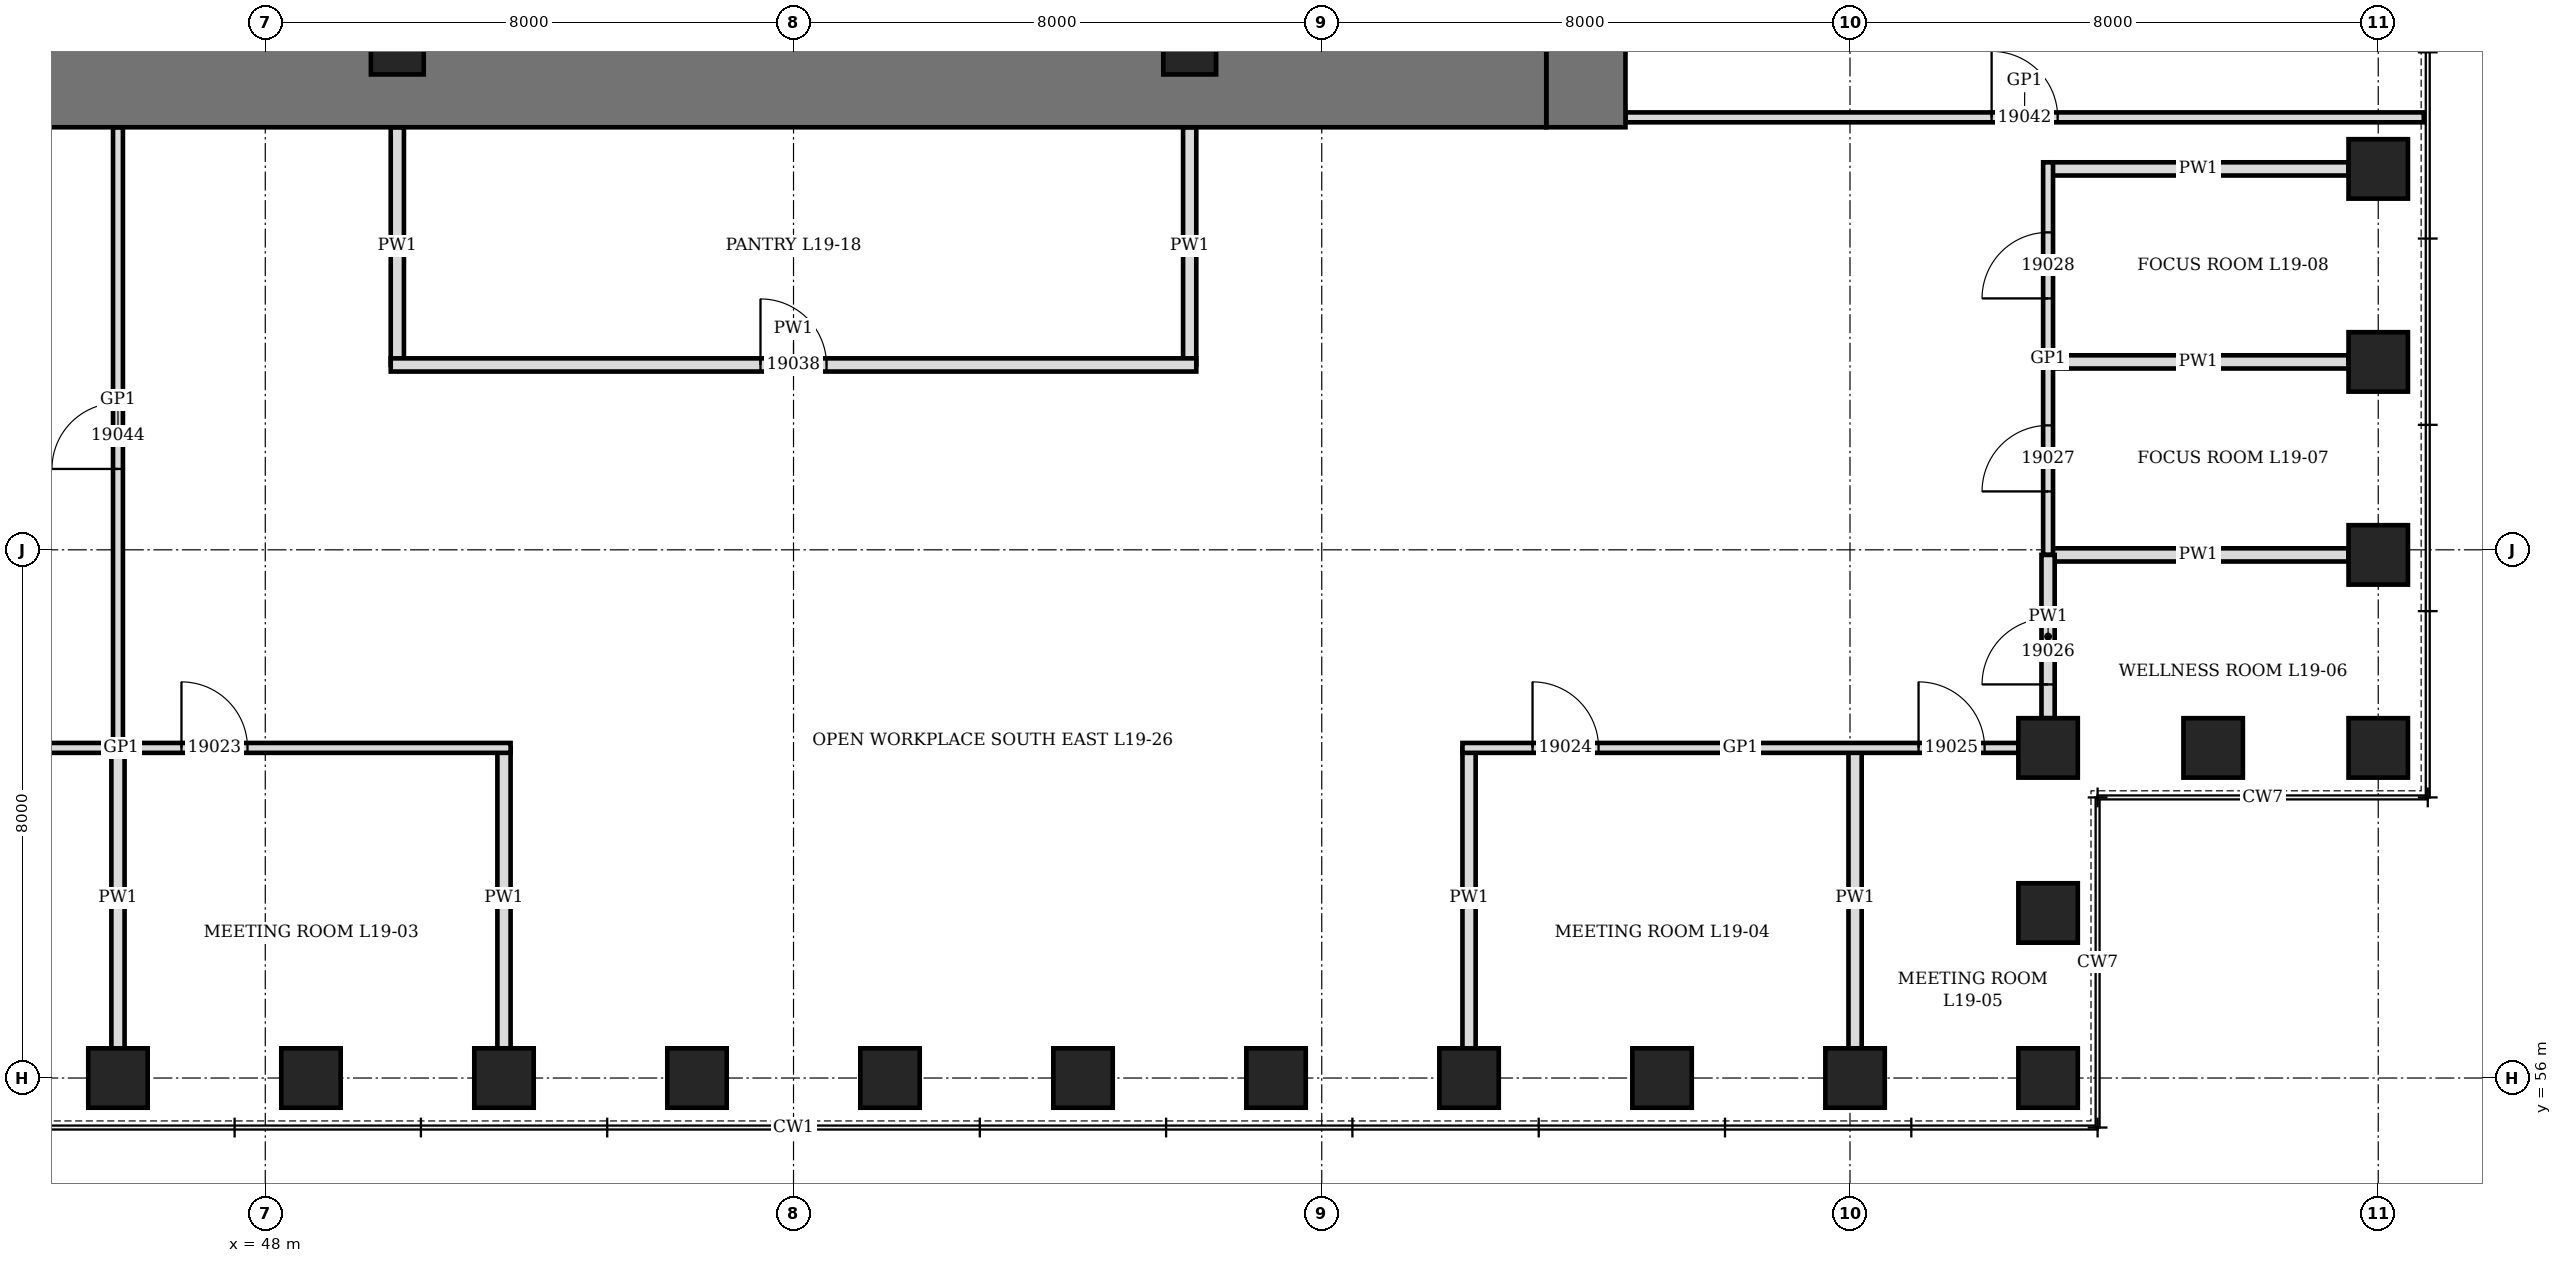
"""IFC4 building model, lengths in metres.
Left out: names, types, materials, properties, quantities, classifications, styles, units other than length and angle.
Written with IfcOpenShell. Run it as: python <this file> out.ifc"""

import sys

from ifc_helpers import new_model, si_unit, direction, frame, frame_2d, origin, origin_2d, place, context, subcontext, project, spatial, rectangle, hollow_rectangle, extrude, element, fill, save


model = new_model("IFC4")
c1 = context("Model", 3, precision=1e-05, world=origin(), true_north=direction((0.0, 1.0)))
c2 = subcontext(c1, "Body", "Model", "MODEL_VIEW")
j1 = project(units=[si_unit("LENGTHUNIT", "METRE"), si_unit("PLANEANGLEUNIT", "RADIAN")], contexts=[c1])
p1 = place(None, origin())
s1 = spatial("IfcSite", under=j1, at=p1, CompositionType="ELEMENT")
p2 = place(p1, origin())
s2 = spatial("IfcBuilding", under=s1, at=p2, CompositionType="ELEMENT")
p3 = place(p2, frame((0.0, 0.0, 89.5)))
s3 = spatial("IfcBuildingStorey", under=s2, at=p3, CompositionType="ELEMENT", Elevation=89.5)
for number, where, z_axis, x_axis in (
    (1, (45.769, 56.0, 0.0), (0.0, 0.0, 1.0), (1.0, 0.0, 0.0)),
    (2, (48.692, 56.0, 0.0), (0.0, 0.0, 1.0), (1.0, 0.0, 0.0)),
    (3, (51.615, 56.0, 0.0), (0.0, 0.0, 1.0), (1.0, 0.0, 0.0)),
    (4, (54.539, 56.0, 0.0), (0.0, 0.0, 1.0), (1.0, 0.0, 0.0)),
    (5, (57.461, 56.0, 0.0), (0.0, 0.0, 1.0), (1.0, 0.0, 0.0)),
    (6, (60.385, 56.0, 0.0), (0.0, 0.0, 1.0), (1.0, 0.0, 0.0)),
    (7, (63.308, 56.0, 0.0), (0.0, 0.0, 1.0), (1.0, 0.0, 0.0)),
    (8, (66.231, 56.0, 0.0), (0.0, 0.0, 1.0), (1.0, 0.0, 0.0)),
    (9, (69.154, 56.0, 0.0), (0.0, 0.0, 1.0), (1.0, 0.0, 0.0)),
    (10, (72.077, 56.0, 0.0), (0.0, 0.0, 1.0), (1.0, 0.0, 0.0)),
    (11, (75.0, 56.0, 0.0), (0.0, 0.0, 1.0), (0.0, 1.0, 0.0)),
    (12, (75.0, 58.5, 0.0), (0.0, 0.0, 1.0), (0.0, 1.0, 0.0)),
    (13, (75.0, 61.0, 0.0), (0.0, 0.0, 1.0), (1.0, 0.0, 0.0)),
    (14, (77.5, 61.0, 0.0), (0.0, 0.0, 1.0), (1.0, 0.0, 0.0)),
    (15, (80.0, 61.0, 0.0), (0.0, 0.0, 1.0), (0.0, 1.0, 0.0)),
    (16, (80.0, 63.923, 0.0), (0.0, 0.0, 1.0), (0.0, 1.0, 0.0)),
    (17, (80.0, 66.846, 0.0), (0.0, 0.0, 1.0), (0.0, 1.0, 0.0)),
    (18, (80.0, 69.769, 0.0), (0.0, 0.0, 1.0), (0.0, 1.0, 0.0)),
):
    element("IfcColumn", number, at=place(p3, frame(where, z_axis=z_axis, x_axis=x_axis)), inside=s3, PredefinedType="COLUMN", context=c2, shape_type="SweptSolid", body=[
        extrude(hollow_rectangle(XDim=0.9, YDim=0.9, WallThickness=0.12, at=origin_2d()), origin(), (0.0, 0.0, 1.0), 4.2),
    ])
p4 = place(p3, frame((68.0, 70.4, 0.0), z_axis=(0.0, 0.0, 1.0), x_axis=(0.0, 1.0, 0.0)))
e19 = element("IfcWall", 19, at=p4, inside=s3, PredefinedType="SHEAR", context=c2, shape_type="SweptSolid", body=[
    extrude(rectangle(XDim=19.2, YDim=1.2, at=frame_2d((9.6, 0.0))), origin(), (0.0, 0.0, 1.0), 4.2),
])
p5 = place(p4, frame((8.6, 0.0, 0.0)))
e20 = element("IfcOpeningElement", 20, at=p5, cuts=e19, PredefinedType="OPENING", context=c2, shape_type="SweptSolid", body=[
    extrude(rectangle(XDim=2.0, YDim=2.4, at=frame_2d((1.0, 1.2))), frame((0.0, 0.61, 0.0), z_axis=(0.0, -1.0, 0.0), x_axis=(1.0, 0.0, 0.0)), (0.0, 0.0, 1.0), 1.22),
])
p6 = place(p3, frame((44.6, 71.0, 0.0), z_axis=(0.0, 0.0, 1.0), x_axis=(1.0, 0.0, 0.0)))
e21 = element("IfcWall", 21, at=p6, inside=s3, PredefinedType="SHEAR", context=c2, shape_type="SweptSolid", body=[
    extrude(rectangle(XDim=22.8, YDim=1.2, at=frame_2d((11.4, 0.0))), origin(), (0.0, 0.0, 1.0), 4.2),
])
for number, where, z_axis, x_axis in (
    (22, (50.0, 71.6, 0.0), (0.0, 0.0, 1.0), (1.0, 0.0, 0.0)),
    (23, (62.0, 71.6, 0.0), (0.0, 0.0, 1.0), (1.0, 0.0, 0.0)),
):
    element("IfcColumn", number, at=place(p3, frame(where, z_axis=z_axis, x_axis=x_axis)), inside=s3, PredefinedType="COLUMN", context=c2, shape_type="SweptSolid", body=[
        extrude(hollow_rectangle(XDim=0.8, YDim=0.8, WallThickness=0.1, at=origin_2d()), origin(), (0.0, 0.0, 1.0), 4.2),
    ])
for number, where, z_axis, x_axis in (
    (24, (45.769, 56.45, 0.0), (0.0, 0.0, 1.0), (0.0, 1.0, 0.0)),
    (25, (51.615, 56.45, 0.0), (0.0, 0.0, 1.0), (0.0, 1.0, 0.0)),
    (26, (66.231, 56.45, 0.0), (0.0, 0.0, 1.0), (0.0, 1.0, 0.0)),
):
    element("IfcWall", number, at=place(p3, frame(where, z_axis=z_axis, x_axis=x_axis)), inside=s3, PredefinedType="PARTITIONING", context=c2, shape_type="SweptSolid", body=[
        extrude(rectangle(XDim=4.55, YDim=0.2, at=frame_2d((2.275, 0.0))), origin(), (0.0, 0.0, 1.0), 3.278),
    ])
for number, where, z_axis, x_axis in (
    (27, (72.077, 56.45, 0.0), (0.0, 0.0, 1.0), (0.0, 1.0, 0.0)),
    (28, (75.0, 63.923, 0.0), (0.0, 0.0, 1.0), (1.0, 0.0, 0.0)),
    (29, (75.0, 66.846, 0.0), (0.0, 0.0, 1.0), (1.0, 0.0, 0.0)),
    (30, (75.0, 69.769, 0.0), (0.0, 0.0, 1.0), (1.0, 0.0, 0.0)),
):
    element("IfcWall", number, at=place(p3, frame(where, z_axis=z_axis, x_axis=x_axis)), inside=s3, PredefinedType="PARTITIONING", context=c2, shape_type="SweptSolid", body=[
        extrude(rectangle(XDim=4.55, YDim=0.2, at=frame_2d((2.275, 0.0))), origin(), (0.0, 0.0, 1.0), 3.428),
    ])
for number, where, z_axis, x_axis in (
    (31, (50.0, 66.8, 0.0), (0.0, 0.0, 1.0), (0.0, 1.0, 0.0)),
    (32, (62.0, 66.8, 0.0), (0.0, 0.0, 1.0), (0.0, 1.0, 0.0)),
):
    element("IfcWall", number, at=place(p3, frame(where, z_axis=z_axis, x_axis=x_axis)), inside=s3, PredefinedType="PARTITIONING", context=c2, shape_type="SweptSolid", body=[
        extrude(rectangle(XDim=3.6, YDim=0.2, at=frame_2d((1.8, 0.0))), origin(), (0.0, 0.0, 1.0), 4.04),
    ])
p7 = place(p3, frame((39.923, 61.0, 0.0), z_axis=(0.0, 0.0, 1.0), x_axis=(1.0, 0.0, 0.0)))
e33 = element("IfcWall", 33, at=p7, inside=s3, PredefinedType="PARTITIONING", context=c2, shape_type="SweptSolid", body=[
    extrude(rectangle(XDim=11.792, YDim=0.15, at=frame_2d((5.896, 0.0))), origin(), (0.0, 0.0, 1.0), 4.04),
])
p8 = place(p7, frame((0.961, 0.0, 0.0)))
e34 = element("IfcOpeningElement", 34, at=p8, cuts=e33, PredefinedType="OPENING", context=c2, shape_type="SweptSolid", body=[
    extrude(rectangle(XDim=1.0, YDim=2.4, at=frame_2d((0.5, 1.2))), frame((0.0, 0.085, 0.0), z_axis=(0.0, -1.0, 0.0), x_axis=(1.0, 0.0, 0.0)), (0.0, 0.0, 1.0), 0.17),
])
p9 = place(p7, frame((6.808, 0.0, 0.0)))
e35 = element("IfcOpeningElement", 35, at=p9, cuts=e33, PredefinedType="OPENING", context=c2, shape_type="SweptSolid", body=[
    extrude(rectangle(XDim=1.0, YDim=2.4, at=frame_2d((0.5, 1.2))), frame((0.0, 0.085, 0.0), z_axis=(0.0, -1.0, 0.0), x_axis=(1.0, 0.0, 0.0)), (0.0, 0.0, 1.0), 0.17),
])
p10 = place(p3, frame((66.131, 61.0, 0.0), z_axis=(0.0, 0.0, 1.0), x_axis=(1.0, 0.0, 0.0)))
e36 = element("IfcWall", 36, at=p10, inside=s3, PredefinedType="PARTITIONING", context=c2, shape_type="SweptSolid", body=[
    extrude(rectangle(XDim=8.419, YDim=0.15, at=frame_2d((4.209, 0.0))), origin(), (0.0, 0.0, 1.0), 4.04),
])
p11 = place(p10, frame((1.062, 0.0, 0.0)))
e37 = element("IfcOpeningElement", 37, at=p11, cuts=e36, PredefinedType="OPENING", context=c2, shape_type="SweptSolid", body=[
    extrude(rectangle(XDim=1.0, YDim=2.4, at=frame_2d((0.5, 1.2))), frame((0.0, 0.085, 0.0), z_axis=(0.0, -1.0, 0.0), x_axis=(1.0, 0.0, 0.0)), (0.0, 0.0, 1.0), 0.17),
])
p12 = place(p10, frame((6.908, 0.0, 0.0)))
e38 = element("IfcOpeningElement", 38, at=p12, cuts=e36, PredefinedType="OPENING", context=c2, shape_type="SweptSolid", body=[
    extrude(rectangle(XDim=1.0, YDim=2.4, at=frame_2d((0.5, 1.2))), frame((0.0, 0.085, 0.0), z_axis=(0.0, -1.0, 0.0), x_axis=(1.0, 0.0, 0.0)), (0.0, 0.0, 1.0), 0.17),
])
p13 = place(p3, frame((49.9, 66.8, 0.0), z_axis=(0.0, 0.0, 1.0), x_axis=(1.0, 0.0, 0.0)))
e39 = element("IfcWall", 39, at=p13, inside=s3, PredefinedType="PARTITIONING", context=c2, shape_type="SweptSolid", body=[
    extrude(rectangle(XDim=12.2, YDim=0.2, at=frame_2d((6.1, 0.0))), origin(), (0.0, 0.0, 1.0), 4.04),
])
p14 = place(p13, frame((5.6, 0.0, 0.0)))
e40 = element("IfcOpeningElement", 40, at=p14, cuts=e39, PredefinedType="OPENING", context=c2, shape_type="SweptSolid", body=[
    extrude(rectangle(XDim=1.0, YDim=2.1, at=frame_2d((0.5, 1.05))), frame((0.0, 0.11, 0.0), z_axis=(0.0, -1.0, 0.0), x_axis=(1.0, 0.0, 0.0)), (0.0, 0.0, 1.0), 0.22),
])
p15 = place(p3, frame((68.6, 70.55, 0.0), z_axis=(0.0, 0.0, 1.0), x_axis=(1.0, 0.0, 0.0)))
e41 = element("IfcWall", 41, at=p15, inside=s3, PredefinedType="PARTITIONING", context=c2, shape_type="SweptSolid", body=[
    extrude(rectangle(XDim=12.09, YDim=0.15, at=frame_2d((6.045, 0.0))), origin(), (0.0, 0.0, 1.0), 4.04),
])
p16 = place(p15, frame((5.545, 0.0, 0.0)))
e42 = element("IfcOpeningElement", 42, at=p16, cuts=e41, PredefinedType="OPENING", context=c2, shape_type="SweptSolid", body=[
    extrude(rectangle(XDim=1.0, YDim=2.4, at=frame_2d((0.5, 1.2))), frame((0.0, 0.085, 0.0), z_axis=(0.0, -1.0, 0.0), x_axis=(1.0, 0.0, 0.0)), (0.0, 0.0, 1.0), 0.17),
])
p17 = place(p3, frame((45.769, 61.05, 0.0), z_axis=(0.0, 0.0, 1.0), x_axis=(0.0, 1.0, 0.0)))
e43 = element("IfcWall", 43, at=p17, inside=s3, PredefinedType="PARTITIONING", context=c2, shape_type="SweptSolid", body=[
    extrude(rectangle(XDim=9.35, YDim=0.15, at=frame_2d((4.675, 0.0))), origin(), (0.0, 0.0, 1.0), 3.278),
])
p18 = place(p17, frame((4.175, 0.0, 0.0)))
e44 = element("IfcOpeningElement", 44, at=p18, cuts=e43, PredefinedType="OPENING", context=c2, shape_type="SweptSolid", body=[
    extrude(rectangle(XDim=1.0, YDim=2.4, at=frame_2d((0.5, 1.2))), frame((0.0, 0.085, 0.0), z_axis=(0.0, -1.0, 0.0), x_axis=(1.0, 0.0, 0.0)), (0.0, 0.0, 1.0), 0.17),
])
p19 = place(p3, frame((75.0, 63.923, 0.0), z_axis=(0.0, 0.0, 1.0), x_axis=(0.0, 1.0, 0.0)))
e45 = element("IfcWall", 45, at=p19, inside=s3, PredefinedType="PARTITIONING", context=c2, shape_type="SweptSolid", body=[
    extrude(rectangle(XDim=5.946, YDim=0.15, at=frame_2d((2.973, 0.0))), origin(), (0.0, 0.0, 1.0), 4.04),
])
p20 = place(p19, frame((0.961, 0.0, 0.0)))
e46 = element("IfcOpeningElement", 46, at=p20, cuts=e45, PredefinedType="OPENING", context=c2, shape_type="SweptSolid", body=[
    extrude(rectangle(XDim=1.0, YDim=2.4, at=frame_2d((0.5, 1.2))), frame((0.0, 0.085, 0.0), z_axis=(0.0, -1.0, 0.0), x_axis=(1.0, 0.0, 0.0)), (0.0, 0.0, 1.0), 0.17),
])
p21 = place(p19, frame((3.885, 0.0, 0.0)))
e47 = element("IfcOpeningElement", 47, at=p21, cuts=e45, PredefinedType="OPENING", context=c2, shape_type="SweptSolid", body=[
    extrude(rectangle(XDim=1.0, YDim=2.4, at=frame_2d((0.5, 1.2))), frame((0.0, 0.085, 0.0), z_axis=(0.0, -1.0, 0.0), x_axis=(1.0, 0.0, 0.0)), (0.0, 0.0, 1.0), 0.17),
])
p22 = place(p3, frame((75.0, 61.45, 0.0), z_axis=(0.0, 0.0, 1.0), x_axis=(0.0, 1.0, 0.0)))
e48 = element("IfcWall", 48, at=p22, inside=s3, PredefinedType="PARTITIONING", context=c2, shape_type="SweptSolid", body=[
    extrude(rectangle(XDim=2.473, YDim=0.2, at=frame_2d((1.237, 0.0))), origin(), (0.0, 0.0, 1.0), 4.04),
])
p23 = place(p22, frame((0.511, 0.0, 0.0)))
e49 = element("IfcOpeningElement", 49, at=p23, cuts=e48, PredefinedType="OPENING", context=c2, shape_type="SweptSolid", body=[
    extrude(rectangle(XDim=1.0, YDim=2.1, at=frame_2d((0.5, 1.05))), frame((0.0, 0.11, 0.0), z_axis=(0.0, -1.0, 0.0), x_axis=(1.0, 0.0, 0.0)), (0.0, 0.0, 1.0), 0.22),
])
p24 = place(p9, origin())
e50 = element("IfcDoor", 50, at=p24, inside=s3, OperationType="SINGLE_SWING_RIGHT", PredefinedType="DOOR", context=c2, shape_type="SweptSolid", body=[
    extrude(rectangle(XDim=1.0, YDim=2.4, at=frame_2d((0.5, 1.2))), frame((0.0, 0.075, 0.0), z_axis=(0.0, -1.0, 0.0), x_axis=(1.0, 0.0, 0.0)), (0.0, 0.0, 1.0), 0.149),
])
fill(e35, e50)
p25 = place(p11, origin())
e51 = element("IfcDoor", 51, at=p25, inside=s3, OperationType="SINGLE_SWING_RIGHT", PredefinedType="DOOR", context=c2, shape_type="SweptSolid", body=[
    extrude(rectangle(XDim=1.0, YDim=2.4, at=frame_2d((0.5, 1.2))), frame((0.0, 0.075, 0.0), z_axis=(0.0, -1.0, 0.0), x_axis=(1.0, 0.0, 0.0)), (0.0, 0.0, 1.0), 0.149),
])
fill(e37, e51)
p26 = place(p12, origin())
e52 = element("IfcDoor", 52, at=p26, inside=s3, OperationType="SINGLE_SWING_RIGHT", PredefinedType="DOOR", context=c2, shape_type="SweptSolid", body=[
    extrude(rectangle(XDim=1.0, YDim=2.4, at=frame_2d((0.5, 1.2))), frame((0.0, 0.075, 0.0), z_axis=(0.0, -1.0, 0.0), x_axis=(1.0, 0.0, 0.0)), (0.0, 0.0, 1.0), 0.149),
])
fill(e38, e52)
p27 = place(p23, origin())
e53 = element("IfcDoor", 53, at=p27, inside=s3, OperationType="SINGLE_SWING_LEFT", PredefinedType="DOOR", context=c2, shape_type="SweptSolid", body=[
    extrude(rectangle(XDim=1.0, YDim=2.1, at=frame_2d((0.5, 1.05))), frame((0.0, 0.1, 0.0), z_axis=(0.0, -1.0, 0.0), x_axis=(1.0, 0.0, 0.0)), (0.0, 0.0, 1.0), 0.199),
])
fill(e49, e53)
p28 = place(p20, origin())
e54 = element("IfcDoor", 54, at=p28, inside=s3, OperationType="SINGLE_SWING_RIGHT", PredefinedType="DOOR", context=c2, shape_type="SweptSolid", body=[
    extrude(rectangle(XDim=1.0, YDim=2.4, at=frame_2d((0.5, 1.2))), frame((0.0, 0.075, 0.0), z_axis=(0.0, -1.0, 0.0), x_axis=(1.0, 0.0, 0.0)), (0.0, 0.0, 1.0), 0.149),
])
fill(e46, e54)
p29 = place(p21, origin())
e55 = element("IfcDoor", 55, at=p29, inside=s3, OperationType="SINGLE_SWING_RIGHT", PredefinedType="DOOR", context=c2, shape_type="SweptSolid", body=[
    extrude(rectangle(XDim=1.0, YDim=2.4, at=frame_2d((0.5, 1.2))), frame((0.0, 0.075, 0.0), z_axis=(0.0, -1.0, 0.0), x_axis=(1.0, 0.0, 0.0)), (0.0, 0.0, 1.0), 0.149),
])
fill(e47, e55)
p30 = place(p14, origin())
e56 = element("IfcDoor", 56, at=p30, inside=s3, OperationType="SINGLE_SWING_LEFT", PredefinedType="DOOR", context=c2, shape_type="SweptSolid", body=[
    extrude(rectangle(XDim=1.0, YDim=2.1, at=frame_2d((0.5, 1.05))), frame((0.0, 0.1, 0.0), z_axis=(0.0, -1.0, 0.0), x_axis=(1.0, 0.0, 0.0)), (0.0, 0.0, 1.0), 0.199),
])
fill(e40, e56)
p31 = place(p16, origin())
e57 = element("IfcDoor", 57, at=p31, inside=s3, OperationType="SINGLE_SWING_RIGHT", PredefinedType="DOOR", context=c2, shape_type="SweptSolid", body=[
    extrude(rectangle(XDim=1.0, YDim=2.4, at=frame_2d((0.5, 1.2))), frame((0.0, 0.075, 0.0), z_axis=(0.0, -1.0, 0.0), x_axis=(1.0, 0.0, 0.0)), (0.0, 0.0, 1.0), 0.149),
])
fill(e42, e57)
p32 = place(p18, origin())
e58 = element("IfcDoor", 58, at=p32, inside=s3, OperationType="SINGLE_SWING_RIGHT", PredefinedType="DOOR", context=c2, shape_type="SweptSolid", body=[
    extrude(rectangle(XDim=1.0, YDim=2.4, at=frame_2d((0.5, 1.2))), frame((0.0, 0.075, 0.0), z_axis=(0.0, -1.0, 0.0), x_axis=(1.0, 0.0, 0.0)), (0.0, 0.0, 1.0), 0.149),
])
fill(e44, e58)
save(model, sys.argv[1])
